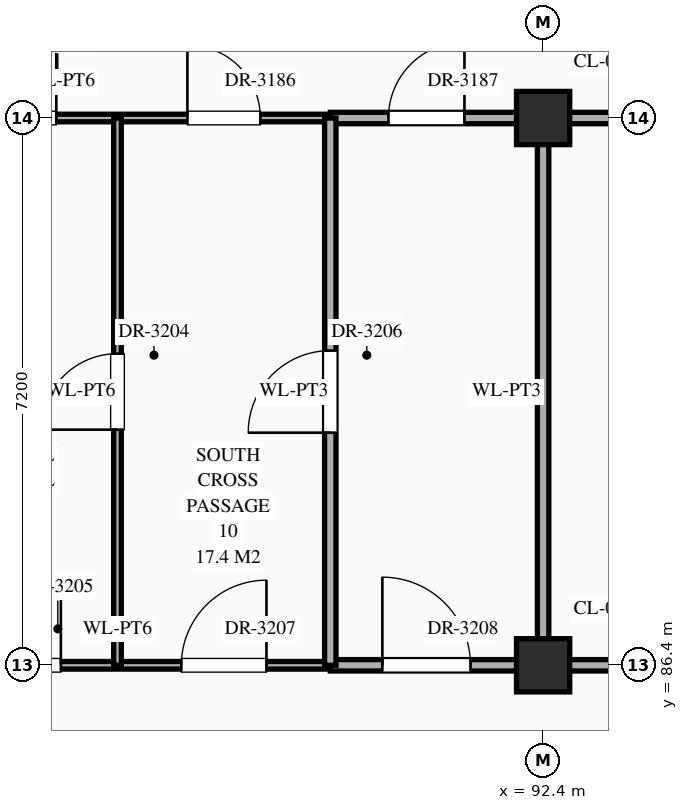
"""IFC4 building model, lengths in metres.
Left out: names, types, materials, properties, quantities, classifications, styles, units other than length and angle.
Written with IfcOpenShell. Run it as: python <this file> out.ifc"""

import sys

from ifc_helpers import new_model, si_unit, direction, frame, frame_2d, origin, origin_2d, place, context, subcontext, project, spatial, rectangle, extrude, element, fill, save


model = new_model("IFC4")
c1 = context("Model", 3, precision=1e-05, world=origin(), true_north=direction((0.0, 1.0)))
c2 = subcontext(c1, "Body", "Model", "MODEL_VIEW")
j1 = project(units=[si_unit("LENGTHUNIT", "METRE"), si_unit("PLANEANGLEUNIT", "RADIAN")], contexts=[c1])
p1 = place(None, origin())
s1 = spatial("IfcSite", under=j1, at=p1, CompositionType="ELEMENT")
p2 = place(p1, origin())
s2 = spatial("IfcBuilding", under=s1, at=p2, CompositionType="ELEMENT")
p3 = place(p2, frame((0.0, 0.0, 56.1)))
s3 = spatial("IfcBuildingStorey", under=s2, at=p3, CompositionType="ELEMENT", Elevation=56.1)
for number, where, z_axis, x_axis in (
    (1, (92.4, 86.4, 0.0), (0.0, 0.0, 1.0), (1.0, 0.0, 0.0)),
    (2, (92.4, 93.6, 0.0), (0.0, 0.0, 1.0), (1.0, 0.0, 0.0)),
):
    element("IfcColumn", number, at=place(p3, frame(where, z_axis=z_axis, x_axis=x_axis)), inside=s3, PredefinedType="COLUMN", context=c2, shape_type="SweptSolid", body=[
        extrude(rectangle(XDim=0.7, YDim=0.7, at=origin_2d()), origin(), (0.0, 0.0, 1.0), 4.2),
    ])
p4 = place(p3, frame((84.0, 86.4, 0.0), z_axis=(0.0, 0.0, 1.0), x_axis=(1.0, 0.0, 0.0)))
e3 = element("IfcWall", 3, at=p4, inside=s3, PredefinedType="STANDARD", context=c2, shape_type="SweptSolid", body=[
    extrude(rectangle(XDim=5.6, YDim=0.1, at=frame_2d((2.8, 0.0))), origin(), (0.0, 0.0, 1.0), 3.11),
])
p5 = place(p4, frame((1.015, 0.0, 0.0)))
e4 = element("IfcOpeningElement", 4, at=p5, cuts=e3, PredefinedType="OPENING", context=c2, shape_type="SweptSolid", body=[
    extrude(rectangle(XDim=1.04, YDim=2.2, at=frame_2d((0.52, 1.1))), frame((0.0, 0.062, 0.0), z_axis=(0.0, -1.0, 0.0), x_axis=(1.0, 0.0, 0.0)), (0.0, 0.0, 1.0), 0.124),
])
p6 = place(p4, frame((3.64, 0.0, 0.0)))
e5 = element("IfcOpeningElement", 5, at=p6, cuts=e3, PredefinedType="OPENING", context=c2, shape_type="SweptSolid", body=[
    extrude(rectangle(XDim=1.12, YDim=2.25, at=frame_2d((0.56, 1.125))), frame((0.0, 0.062, 0.0), z_axis=(0.0, -1.0, 0.0), x_axis=(1.0, 0.0, 0.0)), (0.0, 0.0, 1.0), 0.124),
])
p7 = place(p3, frame((89.6, 86.4, 0.0), z_axis=(0.0, 0.0, 1.0), x_axis=(1.0, 0.0, 0.0)))
e6 = element("IfcWall", 6, at=p7, inside=s3, PredefinedType="STANDARD", context=c2, shape_type="SweptSolid", body=[
    extrude(rectangle(XDim=11.2, YDim=0.15, at=frame_2d((5.6, 0.0))), origin(), (0.0, 0.0, 1.0), 3.11),
])
p8 = place(p7, frame((0.685, 0.0, 0.0)))
e7 = element("IfcOpeningElement", 7, at=p8, cuts=e6, PredefinedType="OPENING", context=c2, shape_type="SweptSolid", body=[
    extrude(rectangle(XDim=1.16, YDim=2.3, at=frame_2d((0.58, 1.15))), frame((0.0, 0.087, 0.0), z_axis=(0.0, -1.0, 0.0), x_axis=(1.0, 0.0, 0.0)), (0.0, 0.0, 1.0), 0.174),
])
p9 = place(p7, frame((6.4, 0.0, 0.0)))
e8 = element("IfcOpeningElement", 8, at=p9, cuts=e6, PredefinedType="OPENING", context=c2, shape_type="SweptSolid", body=[
    extrude(rectangle(XDim=1.2, YDim=2.35, at=frame_2d((0.6, 1.175))), frame((0.0, 0.087, 0.0), z_axis=(0.0, -1.0, 0.0), x_axis=(1.0, 0.0, 0.0)), (0.0, 0.0, 1.0), 0.174),
])
p10 = place(p3, frame((75.6, 93.6, 0.0), z_axis=(0.0, 0.0, 1.0), x_axis=(1.0, 0.0, 0.0)))
e9 = element("IfcWall", 9, at=p10, inside=s3, PredefinedType="STANDARD", context=c2, shape_type="SweptSolid", body=[
    extrude(rectangle(XDim=14.0, YDim=0.1, at=frame_2d((7.0, 0.0))), origin(), (0.0, 0.0, 1.0), 3.11),
])
p11 = place(p10, frame((3.425, 0.0, 0.0)))
e10 = element("IfcOpeningElement", 10, at=p11, cuts=e9, PredefinedType="OPENING", context=c2, shape_type="SweptSolid", body=[
    extrude(rectangle(XDim=1.55, YDim=2.35, at=frame_2d((0.775, 1.175))), frame((0.0, 0.062, 0.0), z_axis=(0.0, -1.0, 0.0), x_axis=(1.0, 0.0, 0.0)), (0.0, 0.0, 1.0), 0.124),
])
p12 = place(p10, frame((9.475, 0.0, 0.0)))
e11 = element("IfcOpeningElement", 11, at=p12, cuts=e9, PredefinedType="OPENING", context=c2, shape_type="SweptSolid", body=[
    extrude(rectangle(XDim=0.92, YDim=2.15, at=frame_2d((0.46, 1.075))), frame((0.0, 0.062, 0.0), z_axis=(0.0, -1.0, 0.0), x_axis=(1.0, 0.0, 0.0)), (0.0, 0.0, 1.0), 0.124),
])
p13 = place(p10, frame((12.12, 0.0, 0.0)))
e12 = element("IfcOpeningElement", 12, at=p13, cuts=e9, PredefinedType="OPENING", context=c2, shape_type="SweptSolid", body=[
    extrude(rectangle(XDim=0.96, YDim=2.2, at=frame_2d((0.48, 1.1))), frame((0.0, 0.062, 0.0), z_axis=(0.0, -1.0, 0.0), x_axis=(1.0, 0.0, 0.0)), (0.0, 0.0, 1.0), 0.124),
])
p14 = place(p3, frame((89.6, 93.6, 0.0), z_axis=(0.0, 0.0, 1.0), x_axis=(1.0, 0.0, 0.0)))
e13 = element("IfcWall", 13, at=p14, inside=s3, PredefinedType="STANDARD", context=c2, shape_type="SweptSolid", body=[
    extrude(rectangle(XDim=11.2, YDim=0.15, at=frame_2d((5.6, 0.0))), origin(), (0.0, 0.0, 1.0), 3.11),
])
p15 = place(p14, frame((0.765, 0.0, 0.0)))
e14 = element("IfcOpeningElement", 14, at=p15, cuts=e13, PredefinedType="OPENING", context=c2, shape_type="SweptSolid", body=[
    extrude(rectangle(XDim=1.0, YDim=2.25, at=frame_2d((0.5, 1.125))), frame((0.0, 0.087, 0.0), z_axis=(0.0, -1.0, 0.0), x_axis=(1.0, 0.0, 0.0)), (0.0, 0.0, 1.0), 0.174),
])
p16 = place(p14, frame((6.48, 0.0, 0.0)))
e15 = element("IfcOpeningElement", 15, at=p16, cuts=e13, PredefinedType="OPENING", context=c2, shape_type="SweptSolid", body=[
    extrude(rectangle(XDim=1.04, YDim=2.2, at=frame_2d((0.52, 1.1))), frame((0.0, 0.087, 0.0), z_axis=(0.0, -1.0, 0.0), x_axis=(1.0, 0.0, 0.0)), (0.0, 0.0, 1.0), 0.174),
])
p17 = place(p3, frame((86.8, 86.4, 0.0), z_axis=(0.0, 0.0, 1.0), x_axis=(0.0, 1.0, 0.0)))
e16 = element("IfcWall", 16, at=p17, inside=s3, PredefinedType="STANDARD", context=c2, shape_type="SweptSolid", body=[
    extrude(rectangle(XDim=7.2, YDim=0.1, at=frame_2d((3.6, 0.0))), origin(), (0.0, 0.0, 1.0), 3.96),
])
p18 = place(p17, frame((3.1, 0.0, 0.0)))
e17 = element("IfcOpeningElement", 17, at=p18, cuts=e16, PredefinedType="OPENING", context=c2, shape_type="SweptSolid", body=[
    extrude(rectangle(XDim=1.0, YDim=2.25, at=frame_2d((0.5, 1.125))), frame((0.0, 0.062, 0.0), z_axis=(0.0, -1.0, 0.0), x_axis=(1.0, 0.0, 0.0)), (0.0, 0.0, 1.0), 0.124),
])
p19 = place(p3, frame((89.6, 86.4, 0.0), z_axis=(0.0, 0.0, 1.0), x_axis=(0.0, 1.0, 0.0)))
e18 = element("IfcWall", 18, at=p19, inside=s3, PredefinedType="STANDARD", context=c2, shape_type="SweptSolid", body=[
    extrude(rectangle(XDim=7.2, YDim=0.15, at=frame_2d((3.6, 0.0))), origin(), (0.0, 0.0, 1.0), 3.96),
])
p20 = place(p19, frame((3.06, 0.0, 0.0)))
e19 = element("IfcOpeningElement", 19, at=p20, cuts=e18, PredefinedType="OPENING", context=c2, shape_type="SweptSolid", body=[
    extrude(rectangle(XDim=1.08, YDim=2.25, at=frame_2d((0.54, 1.125))), frame((0.0, 0.087, 0.0), z_axis=(0.0, -1.0, 0.0), x_axis=(1.0, 0.0, 0.0)), (0.0, 0.0, 1.0), 0.174),
])
p21 = place(p3, frame((92.4, 86.4, 0.0), z_axis=(0.0, 0.0, 1.0), x_axis=(0.0, 1.0, 0.0)))
e20 = element("IfcWall", 20, at=p21, inside=s3, PredefinedType="STANDARD", context=c2, shape_type="SweptSolid", body=[
    extrude(rectangle(XDim=7.2, YDim=0.15, at=frame_2d((3.6, 0.0))), origin(), (0.0, 0.0, 1.0), 3.21),
])
p22 = place(p12, origin())
e21 = element("IfcDoor", 21, at=p22, inside=s3, OperationType="SINGLE_SWING_RIGHT", PredefinedType="DOOR", context=c2, shape_type="SweptSolid", body=[
    extrude(rectangle(XDim=0.92, YDim=2.15, at=frame_2d((0.46, 1.075))), frame((0.0, 0.025, 0.0), z_axis=(0.0, -1.0, 0.0), x_axis=(1.0, 0.0, 0.0)), (0.0, 0.0, 1.0), 0.05),
])
fill(e11, e21)
p23 = place(p13, origin())
e22 = element("IfcDoor", 22, at=p23, inside=s3, OperationType="SINGLE_SWING_LEFT", PredefinedType="DOOR", context=c2, shape_type="SweptSolid", body=[
    extrude(rectangle(XDim=0.96, YDim=2.2, at=frame_2d((0.48, 1.1))), frame((0.0, 0.025, 0.0), z_axis=(0.0, -1.0, 0.0), x_axis=(1.0, 0.0, 0.0)), (0.0, 0.0, 1.0), 0.05),
])
fill(e12, e22)
p24 = place(p15, origin())
e23 = element("IfcDoor", 23, at=p24, inside=s3, OperationType="SINGLE_SWING_RIGHT", PredefinedType="DOOR", context=c2, shape_type="SweptSolid", body=[
    extrude(rectangle(XDim=1.0, YDim=2.25, at=frame_2d((0.5, 1.125))), frame((0.0, 0.025, 0.0), z_axis=(0.0, -1.0, 0.0), x_axis=(1.0, 0.0, 0.0)), (0.0, 0.0, 1.0), 0.05),
])
fill(e14, e23)
p25 = place(p18, origin())
e24 = element("IfcDoor", 24, at=p25, inside=s3, OperationType="SINGLE_SWING_LEFT", PredefinedType="DOOR", context=c2, shape_type="SweptSolid", body=[
    extrude(rectangle(XDim=1.0, YDim=2.25, at=frame_2d((0.5, 1.125))), frame((0.0, 0.025, 0.0), z_axis=(0.0, -1.0, 0.0), x_axis=(1.0, 0.0, 0.0)), (0.0, 0.0, 1.0), 0.05),
])
fill(e17, e24)
p26 = place(p5, origin())
e25 = element("IfcDoor", 25, at=p26, inside=s3, OperationType="SINGLE_SWING_RIGHT", PredefinedType="DOOR", context=c2, shape_type="SweptSolid", body=[
    extrude(rectangle(XDim=1.04, YDim=2.2, at=frame_2d((0.52, 1.1))), frame((0.0, 0.025, 0.0), z_axis=(0.0, -1.0, 0.0), x_axis=(1.0, 0.0, 0.0)), (0.0, 0.0, 1.0), 0.05),
])
fill(e4, e25)
p27 = place(p20, origin())
e26 = element("IfcDoor", 26, at=p27, inside=s3, OperationType="SINGLE_SWING_LEFT", PredefinedType="DOOR", context=c2, shape_type="SweptSolid", body=[
    extrude(rectangle(XDim=1.08, YDim=2.25, at=frame_2d((0.54, 1.125))), frame((0.0, 0.025, 0.0), z_axis=(0.0, -1.0, 0.0), x_axis=(1.0, 0.0, 0.0)), (0.0, 0.0, 1.0), 0.05),
])
fill(e19, e26)
p28 = place(p6, origin())
e27 = element("IfcDoor", 27, at=p28, inside=s3, OperationType="SINGLE_SWING_RIGHT", PredefinedType="DOOR", context=c2, shape_type="SweptSolid", body=[
    extrude(rectangle(XDim=1.12, YDim=2.25, at=frame_2d((0.56, 1.125))), frame((0.0, 0.025, 0.0), z_axis=(0.0, -1.0, 0.0), x_axis=(1.0, 0.0, 0.0)), (0.0, 0.0, 1.0), 0.05),
])
fill(e5, e27)
p29 = place(p8, origin())
e28 = element("IfcDoor", 28, at=p29, inside=s3, OperationType="SINGLE_SWING_LEFT", PredefinedType="DOOR", context=c2, shape_type="SweptSolid", body=[
    extrude(rectangle(XDim=1.16, YDim=2.3, at=frame_2d((0.58, 1.15))), frame((0.0, 0.025, 0.0), z_axis=(0.0, -1.0, 0.0), x_axis=(1.0, 0.0, 0.0)), (0.0, 0.0, 1.0), 0.05),
])
fill(e7, e28)
save(model, sys.argv[1])
